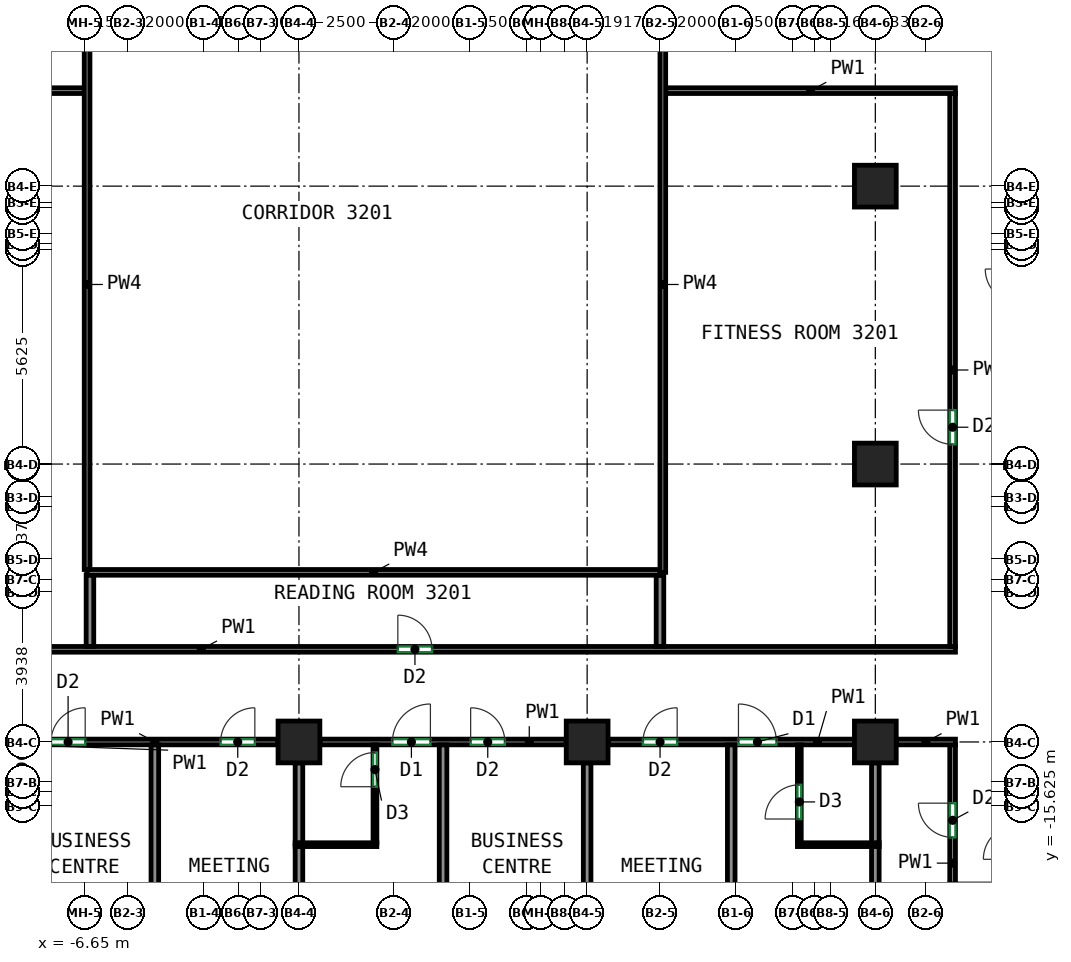
"""IFC4 building model, lengths in metres.
Left out: names, types, materials, properties, quantities, classifications, styles, units other than length and angle.
Written with IfcOpenShell. Run it as: python <this file> out.ifc"""

import sys

from ifc_helpers import new_model, si_unit, direction, frame, frame_2d, origin, origin_2d, place, context, subcontext, project, spatial, rectangle, extrude, source, transform, mapped, element, fill, save


model = new_model("IFC4")
c1 = context("Model", 3, precision=1e-05, world=origin(), true_north=direction((0.0, 1.0)))
c2 = subcontext(c1, "Body", "Model", "MODEL_VIEW")
j1 = project(units=[si_unit("LENGTHUNIT", "METRE"), si_unit("PLANEANGLEUNIT", "RADIAN")], contexts=[c1])
p1 = place(None, origin())
s1 = spatial("IfcSite", under=j1, at=p1, CompositionType="ELEMENT")
p2 = place(p1, origin())
s2 = spatial("IfcBuilding", under=s1, at=p2, CompositionType="ELEMENT")
p3 = place(p2, frame((0.0, 0.0, 143.9)))
s3 = spatial("IfcBuildingStorey", under=s2, at=p3, CompositionType="ELEMENT", Elevation=143.9)
m1 = source(origin(), c2, "Body", "SweptSolid", [
    extrude(rectangle(XDim=1.1, YDim=1.1, at=origin_2d()), origin(), (0.0, 0.0, 1.0), 3.12),
])
for number, where, z_axis, x_axis in (
    (1, (-1.0, -13.938, 0.0), (0.0, 0.0, 1.0), (1.0, 0.0, 0.0)),
    (2, (6.583, -13.938, 0.0), (0.0, 0.0, 1.0), (1.0, 0.0, 0.0)),
    (3, (14.167, -13.938, 0.0), (0.0, 0.0, 1.0), (1.0, 0.0, 0.0)),
    (4, (14.167, -6.625, 0.0), (0.0, 0.0, 1.0), (1.0, 0.0, 0.0)),
    (5, (14.167, 0.688, 0.0), (0.0, 0.0, 1.0), (1.0, 0.0, 0.0)),
):
    element("IfcColumn", number, at=place(p3, frame(where, z_axis=z_axis, x_axis=x_axis)), inside=s3, PredefinedType="COLUMN", context=c2, shape_type="MappedRepresentation", body=[
        mapped(m1, transform((0.0, 0.0, 0.0))),
    ])
p4 = place(p3, frame((-8.033, -13.938, 0.0), z_axis=(0.0, 0.0, 1.0), x_axis=(1.0, 0.0, 0.0)))
e6 = element("IfcWall", 6, at=p4, inside=s3, PredefinedType="PARTITIONING", context=c2, shape_type="SweptSolid", body=[
    extrude(rectangle(XDim=6.483, YDim=0.15, at=frame_2d((3.241, 0.0))), origin(), (0.0, 0.0, 1.0), 3.12),
])
p5 = place(p4, frame((0.508, 0.0, 0.0)))
e7 = element("IfcOpeningElement", 7, at=p5, cuts=e6, PredefinedType="OPENING", context=c2, shape_type="SweptSolid", body=[
    extrude(rectangle(XDim=0.9, YDim=2.1, at=frame_2d((0.45, 1.05))), frame((0.0, 0.085, 0.0), z_axis=(0.0, -1.0, 0.0), x_axis=(1.0, 0.0, 0.0)), (0.0, 0.0, 1.0), 0.17),
])
p6 = place(p4, frame((4.972, 0.0, 0.0)))
e8 = element("IfcOpeningElement", 8, at=p6, cuts=e6, PredefinedType="OPENING", context=c2, shape_type="SweptSolid", body=[
    extrude(rectangle(XDim=0.9, YDim=2.1, at=frame_2d((0.45, 1.05))), frame((0.0, 0.085, 0.0), z_axis=(0.0, -1.0, 0.0), x_axis=(1.0, 0.0, 0.0)), (0.0, 0.0, 1.0), 0.17),
])
p7 = place(p3, frame((-0.45, -13.938, 0.0), z_axis=(0.0, 0.0, 1.0), x_axis=(1.0, 0.0, 0.0)))
e9 = element("IfcWall", 9, at=p7, inside=s3, PredefinedType="PARTITIONING", context=c2, shape_type="SweptSolid", body=[
    extrude(rectangle(XDim=6.483, YDim=0.15, at=frame_2d((3.241, 0.0))), origin(), (0.0, 0.0, 1.0), 3.12),
])
p8 = place(p7, frame((1.909, 0.0, 0.0)))
e10 = element("IfcOpeningElement", 10, at=p8, cuts=e9, PredefinedType="OPENING", context=c2, shape_type="SweptSolid", body=[
    extrude(rectangle(XDim=1.0, YDim=2.1, at=frame_2d((0.5, 1.05))), frame((0.0, 0.085, 0.0), z_axis=(0.0, -1.0, 0.0), x_axis=(1.0, 0.0, 0.0)), (0.0, 0.0, 1.0), 0.17),
])
p9 = place(p7, frame((3.968, 0.0, 0.0)))
e11 = element("IfcOpeningElement", 11, at=p9, cuts=e9, PredefinedType="OPENING", context=c2, shape_type="SweptSolid", body=[
    extrude(rectangle(XDim=0.9, YDim=2.1, at=frame_2d((0.45, 1.05))), frame((0.0, 0.085, 0.0), z_axis=(0.0, -1.0, 0.0), x_axis=(1.0, 0.0, 0.0)), (0.0, 0.0, 1.0), 0.17),
])
p10 = place(p3, frame((7.133, -13.938, 0.0), z_axis=(0.0, 0.0, 1.0), x_axis=(1.0, 0.0, 0.0)))
e12 = element("IfcWall", 12, at=p10, inside=s3, PredefinedType="PARTITIONING", context=c2, shape_type="SweptSolid", body=[
    extrude(rectangle(XDim=6.484, YDim=0.15, at=frame_2d((3.242, 0.0))), origin(), (0.0, 0.0, 1.0), 3.12),
])
p11 = place(p10, frame((0.919, 0.0, 0.0)))
e13 = element("IfcOpeningElement", 13, at=p11, cuts=e12, PredefinedType="OPENING", context=c2, shape_type="SweptSolid", body=[
    extrude(rectangle(XDim=0.9, YDim=2.1, at=frame_2d((0.45, 1.05))), frame((0.0, 0.085, 0.0), z_axis=(0.0, -1.0, 0.0), x_axis=(1.0, 0.0, 0.0)), (0.0, 0.0, 1.0), 0.17),
])
p12 = place(p10, frame((3.432, 0.0, 0.0)))
e14 = element("IfcOpeningElement", 14, at=p12, cuts=e12, PredefinedType="OPENING", context=c2, shape_type="SweptSolid", body=[
    extrude(rectangle(XDim=1.0, YDim=2.1, at=frame_2d((0.5, 1.05))), frame((0.0, 0.085, 0.0), z_axis=(0.0, -1.0, 0.0), x_axis=(1.0, 0.0, 0.0)), (0.0, 0.0, 1.0), 0.17),
])
p13 = place(p3, frame((16.2, -17.675, 0.0), z_axis=(0.0, 0.0, 1.0), x_axis=(0.0, 1.0, 0.0)))
e15 = element("IfcWall", 15, at=p13, inside=s3, PredefinedType="PARTITIONING", context=c2, shape_type="SweptSolid", body=[
    extrude(rectangle(XDim=3.662, YDim=0.15, at=frame_2d((1.831, 0.0))), origin(), (0.0, 0.0, 1.0), 3.12),
])
p14 = place(p13, frame((1.227, 0.0, 0.0)))
e16 = element("IfcOpeningElement", 16, at=p14, cuts=e15, PredefinedType="OPENING", context=c2, shape_type="SweptSolid", body=[
    extrude(rectangle(XDim=0.9, YDim=2.1, at=frame_2d((0.45, 1.05))), frame((0.0, 0.085, 0.0), z_axis=(0.0, -1.0, 0.0), x_axis=(1.0, 0.0, 0.0)), (0.0, 0.0, 1.0), 0.17),
])
p15 = place(p3, frame((14.717, -13.938, 0.0), z_axis=(0.0, 0.0, 1.0), x_axis=(1.0, 0.0, 0.0)))
e17 = element("IfcWall", 17, at=p15, inside=s3, PredefinedType="PARTITIONING", context=c2, shape_type="SweptSolid", body=[
    extrude(rectangle(XDim=1.558, YDim=0.15, at=frame_2d((0.779, 0.0))), origin(), (0.0, 0.0, 1.0), 3.12),
])
p16 = place(p3, frame((-12.075, 3.2, 0.0), z_axis=(0.0, 0.0, 1.0), x_axis=(1.0, 0.0, 0.0)))
e18 = element("IfcWall", 18, at=p16, inside=s3, PredefinedType="PARTITIONING", context=c2, shape_type="SweptSolid", body=[
    extrude(rectangle(XDim=5.425, YDim=0.15, at=frame_2d((2.712, 0.0))), origin(), (0.0, 0.0, 1.0), 3.12),
])
p17 = place(p3, frame((-12.075, -11.5, 0.0), z_axis=(0.0, 0.0, 1.0), x_axis=(1.0, 0.0, 0.0)))
e19 = element("IfcWall", 19, at=p17, inside=s3, PredefinedType="PARTITIONING", context=c2, shape_type="SweptSolid", body=[
    extrude(rectangle(XDim=28.35, YDim=0.15, at=frame_2d((14.175, 0.0))), origin(), (0.0, 0.0, 1.0), 3.12),
])
p18 = place(p17, frame((13.677, 0.0, 0.0)))
e20 = element("IfcOpeningElement", 20, at=p18, cuts=e19, PredefinedType="OPENING", context=c2, shape_type="SweptSolid", body=[
    extrude(rectangle(XDim=0.9, YDim=2.1, at=frame_2d((0.45, 1.05))), frame((0.0, 0.085, 0.0), z_axis=(0.0, -1.0, 0.0), x_axis=(1.0, 0.0, 0.0)), (0.0, 0.0, 1.0), 0.17),
])
p19 = place(p3, frame((16.2, -11.425, 0.0), z_axis=(0.0, 0.0, 1.0), x_axis=(0.0, 1.0, 0.0)))
e21 = element("IfcWall", 21, at=p19, inside=s3, PredefinedType="PARTITIONING", context=c2, shape_type="SweptSolid", body=[
    extrude(rectangle(XDim=14.55, YDim=0.15, at=frame_2d((7.275, 0.0))), origin(), (0.0, 0.0, 1.0), 3.12),
])
p20 = place(p19, frame((5.319, 0.0, 0.0)))
e22 = element("IfcOpeningElement", 22, at=p20, cuts=e21, PredefinedType="OPENING", context=c2, shape_type="SweptSolid", body=[
    extrude(rectangle(XDim=0.9, YDim=2.1, at=frame_2d((0.45, 1.05))), frame((0.0, 0.085, 0.0), z_axis=(0.0, -1.0, 0.0), x_axis=(1.0, 0.0, 0.0)), (0.0, 0.0, 1.0), 0.17),
])
p21 = place(p3, frame((8.65, 3.2, 0.0), z_axis=(0.0, 0.0, 1.0), x_axis=(1.0, 0.0, 0.0)))
e23 = element("IfcWall", 23, at=p21, inside=s3, PredefinedType="PARTITIONING", context=c2, shape_type="SweptSolid", body=[
    extrude(rectangle(XDim=7.625, YDim=0.15, at=frame_2d((3.812, 0.0))), origin(), (0.0, 0.0, 1.0), 3.12),
])
p22 = place(p3, frame((-4.792, -21.0, 0.0), z_axis=(0.0, 0.0, 1.0), x_axis=(0.0, 1.0, 0.0)))
e24 = element("IfcWall", 24, at=p22, inside=s3, PredefinedType="PARTITIONING", context=c2, shape_type="SweptSolid", body=[
    extrude(rectangle(XDim=6.985, YDim=0.2, at=frame_2d((3.493, 0.0))), origin(), (0.0, 0.0, 1.0), 3.12),
])
p23 = place(p3, frame((-1.0, -20.4, 0.0), z_axis=(0.0, 0.0, 1.0), x_axis=(0.0, 1.0, 0.0)))
e25 = element("IfcWall", 25, at=p23, inside=s3, PredefinedType="PARTITIONING", context=c2, shape_type="SweptSolid", body=[
    extrude(rectangle(XDim=3.72, YDim=0.2, at=frame_2d((1.86, 0.0))), origin(), (0.0, 0.0, 1.0), 3.12),
])
p24 = place(p3, frame((-1.0, -16.6, 0.0), z_axis=(0.0, 0.0, 1.0), x_axis=(0.0, 1.0, 0.0)))
e26 = element("IfcWall", 26, at=p24, inside=s3, PredefinedType="PARTITIONING", context=c2, shape_type="SweptSolid", body=[
    extrude(rectangle(XDim=2.112, YDim=0.2, at=frame_2d((1.056, 0.0))), origin(), (0.0, 0.0, 1.0), 3.12),
])
p25 = place(p3, frame((1.0, -16.59, 0.0), z_axis=(0.0, 0.0, 1.0), x_axis=(0.0, 1.0, 0.0)))
e27 = element("IfcWall", 27, at=p25, inside=s3, PredefinedType="PARTITIONING", context=c2, shape_type="SweptSolid", body=[
    extrude(rectangle(XDim=2.575, YDim=0.1, at=frame_2d((1.288, 0.0))), origin(), (0.0, 0.0, 1.0), 3.12),
])
p26 = place(p25, frame((1.475, 0.0, 0.0)))
e28 = element("IfcOpeningElement", 28, at=p26, cuts=e27, PredefinedType="OPENING", context=c2, shape_type="SweptSolid", body=[
    extrude(rectangle(XDim=0.9, YDim=2.1, at=frame_2d((0.45, 1.05))), frame((0.0, 0.06, 0.0), z_axis=(0.0, -1.0, 0.0), x_axis=(1.0, 0.0, 0.0)), (0.0, 0.0, 1.0), 0.12),
])
p27 = place(p3, frame((-1.1, -16.64, 0.0), z_axis=(0.0, 0.0, 1.0), x_axis=(1.0, 0.0, 0.0)))
e29 = element("IfcWall", 29, at=p27, inside=s3, PredefinedType="PARTITIONING", context=c2, shape_type="SweptSolid", body=[
    extrude(rectangle(XDim=2.15, YDim=0.1, at=frame_2d((1.075, 0.0))), origin(), (0.0, 0.0, 1.0), 3.12),
])
p28 = place(p3, frame((2.792, -21.0, 0.0), z_axis=(0.0, 0.0, 1.0), x_axis=(0.0, 1.0, 0.0)))
e30 = element("IfcWall", 30, at=p28, inside=s3, PredefinedType="PARTITIONING", context=c2, shape_type="SweptSolid", body=[
    extrude(rectangle(XDim=6.985, YDim=0.2, at=frame_2d((3.493, 0.0))), origin(), (0.0, 0.0, 1.0), 3.12),
])
p29 = place(p3, frame((6.583, -20.4, 0.0), z_axis=(0.0, 0.0, 1.0), x_axis=(0.0, 1.0, 0.0)))
e31 = element("IfcWall", 31, at=p29, inside=s3, PredefinedType="PARTITIONING", context=c2, shape_type="SweptSolid", body=[
    extrude(rectangle(XDim=5.912, YDim=0.2, at=frame_2d((2.956, 0.0))), origin(), (0.0, 0.0, 1.0), 3.12),
])
p30 = place(p3, frame((10.375, -21.0, 0.0), z_axis=(0.0, 0.0, 1.0), x_axis=(0.0, 1.0, 0.0)))
e32 = element("IfcWall", 32, at=p30, inside=s3, PredefinedType="PARTITIONING", context=c2, shape_type="SweptSolid", body=[
    extrude(rectangle(XDim=6.985, YDim=0.2, at=frame_2d((3.493, 0.0))), origin(), (0.0, 0.0, 1.0), 3.12),
])
p31 = place(p3, frame((12.167, -16.59, 0.0), z_axis=(0.0, 0.0, 1.0), x_axis=(0.0, 1.0, 0.0)))
e33 = element("IfcWall", 33, at=p31, inside=s3, PredefinedType="PARTITIONING", context=c2, shape_type="SweptSolid", body=[
    extrude(rectangle(XDim=2.575, YDim=0.1, at=frame_2d((1.288, 0.0))), origin(), (0.0, 0.0, 1.0), 3.12),
])
p32 = place(p31, frame((0.625, 0.0, 0.0)))
e34 = element("IfcOpeningElement", 34, at=p32, cuts=e33, PredefinedType="OPENING", context=c2, shape_type="SweptSolid", body=[
    extrude(rectangle(XDim=0.9, YDim=2.1, at=frame_2d((0.45, 1.05))), frame((0.0, 0.06, 0.0), z_axis=(0.0, -1.0, 0.0), x_axis=(1.0, 0.0, 0.0)), (0.0, 0.0, 1.0), 0.12),
])
p33 = place(p3, frame((12.117, -16.64, 0.0), z_axis=(0.0, 0.0, 1.0), x_axis=(1.0, 0.0, 0.0)))
e35 = element("IfcWall", 35, at=p33, inside=s3, PredefinedType="PARTITIONING", context=c2, shape_type="SweptSolid", body=[
    extrude(rectangle(XDim=2.15, YDim=0.1, at=frame_2d((1.075, 0.0))), origin(), (0.0, 0.0, 1.0), 3.12),
])
p34 = place(p3, frame((14.167, -20.4, 0.0), z_axis=(0.0, 0.0, 1.0), x_axis=(0.0, 1.0, 0.0)))
e36 = element("IfcWall", 36, at=p34, inside=s3, PredefinedType="PARTITIONING", context=c2, shape_type="SweptSolid", body=[
    extrude(rectangle(XDim=3.71, YDim=0.2, at=frame_2d((1.855, 0.0))), origin(), (0.0, 0.0, 1.0), 3.12),
])
p35 = place(p3, frame((14.167, -16.59, 0.0), z_axis=(0.0, 0.0, 1.0), x_axis=(0.0, 1.0, 0.0)))
e37 = element("IfcWall", 37, at=p35, inside=s3, PredefinedType="PARTITIONING", context=c2, shape_type="SweptSolid", body=[
    extrude(rectangle(XDim=2.102, YDim=0.2, at=frame_2d((1.051, 0.0))), origin(), (0.0, 0.0, 1.0), 3.12),
])
p36 = place(p3, frame((-6.5, -11.423, 0.0), z_axis=(0.0, 0.0, 1.0), x_axis=(0.0, 1.0, 0.0)))
e38 = element("IfcWall", 38, at=p36, inside=s3, PredefinedType="PARTITIONING", context=c2, shape_type="SweptSolid", body=[
    extrude(rectangle(XDim=1.883, YDim=0.2, at=frame_2d((0.941, 0.0))), origin(), (0.0, 0.0, 1.0), 3.12),
])
p37 = place(p3, frame((8.5, -11.423, 0.0), z_axis=(0.0, 0.0, 1.0), x_axis=(0.0, 1.0, 0.0)))
e39 = element("IfcWall", 39, at=p37, inside=s3, PredefinedType="PARTITIONING", context=c2, shape_type="SweptSolid", body=[
    extrude(rectangle(XDim=1.873, YDim=0.2, at=frame_2d((0.937, 0.0))), origin(), (0.0, 0.0, 1.0), 3.12),
])
p38 = place(p3, frame((8.5, -9.475, 0.0), z_axis=(0.0, 0.0, 1.0), x_axis=(-1.0, 0.0, 0.0)))
e40 = element("IfcWall", 40, at=p38, inside=s3, PredefinedType="PARTITIONING", context=c2, shape_type="SweptSolid", body=[
    extrude(rectangle(XDim=15.075, YDim=0.15, at=frame_2d((7.538, 0.0))), origin(), (0.0, 0.0, 1.0), 3.12),
])
p39 = place(p3, frame((-6.575, -9.4, 0.0), z_axis=(0.0, 0.0, 1.0), x_axis=(0.0, 1.0, 0.0)))
e41 = element("IfcWall", 41, at=p39, inside=s3, PredefinedType="PARTITIONING", context=c2, shape_type="SweptSolid", body=[
    extrude(rectangle(XDim=15.0, YDim=0.15, at=frame_2d((7.5, 0.0))), origin(), (0.0, 0.0, 1.0), 3.12),
])
p40 = place(p3, frame((8.575, 5.675, 0.0), z_axis=(0.0, 0.0, 1.0), x_axis=(0.0, -1.0, 0.0)))
e42 = element("IfcWall", 42, at=p40, inside=s3, PredefinedType="PARTITIONING", context=c2, shape_type="SweptSolid", body=[
    extrude(rectangle(XDim=15.15, YDim=0.15, at=frame_2d((7.575, 0.0))), origin(), (0.0, 0.0, 1.0), 3.12),
])
p41 = place(p14, origin())
e43 = element("IfcDoor", 43, at=p41, inside=s3, OperationType="SINGLE_SWING_RIGHT", PredefinedType="DOOR", context=c2, shape_type="SweptSolid", body=[
    extrude(rectangle(XDim=0.9, YDim=2.1, at=frame_2d((0.45, 1.05))), frame((0.0, 0.025, 0.0), z_axis=(0.0, -1.0, 0.0), x_axis=(1.0, 0.0, 0.0)), (0.0, 0.0, 1.0), 0.05),
])
fill(e16, e43)
p42 = place(p32, origin())
e44 = element("IfcDoor", 44, at=p42, inside=s3, OperationType="SINGLE_SWING_LEFT", PredefinedType="DOOR", context=c2, shape_type="SweptSolid", body=[
    extrude(rectangle(XDim=0.9, YDim=2.1, at=frame_2d((0.45, 1.05))), frame((0.0, 0.025, 0.0), z_axis=(0.0, -1.0, 0.0), x_axis=(1.0, 0.0, 0.0)), (0.0, 0.0, 1.0), 0.05),
])
fill(e34, e44)
p43 = place(p26, origin())
e45 = element("IfcDoor", 45, at=p43, inside=s3, OperationType="SINGLE_SWING_LEFT", PredefinedType="DOOR", context=c2, shape_type="SweptSolid", body=[
    extrude(rectangle(XDim=0.9, YDim=2.1, at=frame_2d((0.45, 1.05))), frame((0.0, 0.025, 0.0), z_axis=(0.0, -1.0, 0.0), x_axis=(1.0, 0.0, 0.0)), (0.0, 0.0, 1.0), 0.05),
])
fill(e28, e45)
p44 = place(p5, origin())
e46 = element("IfcDoor", 46, at=p44, inside=s3, OperationType="SINGLE_SWING_RIGHT", PredefinedType="DOOR", context=c2, shape_type="SweptSolid", body=[
    extrude(rectangle(XDim=0.9, YDim=2.1, at=frame_2d((0.45, 1.05))), frame((0.0, 0.025, 0.0), z_axis=(0.0, -1.0, 0.0), x_axis=(1.0, 0.0, 0.0)), (0.0, 0.0, 1.0), 0.05),
])
fill(e7, e46)
p45 = place(p6, origin())
e47 = element("IfcDoor", 47, at=p45, inside=s3, OperationType="SINGLE_SWING_RIGHT", PredefinedType="DOOR", context=c2, shape_type="SweptSolid", body=[
    extrude(rectangle(XDim=0.9, YDim=2.1, at=frame_2d((0.45, 1.05))), frame((0.0, 0.025, 0.0), z_axis=(0.0, -1.0, 0.0), x_axis=(1.0, 0.0, 0.0)), (0.0, 0.0, 1.0), 0.05),
])
fill(e8, e47)
p46 = place(p8, origin())
e48 = element("IfcDoor", 48, at=p46, inside=s3, OperationType="SINGLE_SWING_RIGHT", PredefinedType="DOOR", context=c2, shape_type="SweptSolid", body=[
    extrude(rectangle(XDim=1.0, YDim=2.1, at=frame_2d((0.5, 1.05))), frame((0.0, 0.025, 0.0), z_axis=(0.0, -1.0, 0.0), x_axis=(1.0, 0.0, 0.0)), (0.0, 0.0, 1.0), 0.05),
])
fill(e10, e48)
p47 = place(p9, origin())
e49 = element("IfcDoor", 49, at=p47, inside=s3, OperationType="SINGLE_SWING_LEFT", PredefinedType="DOOR", context=c2, shape_type="SweptSolid", body=[
    extrude(rectangle(XDim=0.9, YDim=2.1, at=frame_2d((0.45, 1.05))), frame((0.0, 0.025, 0.0), z_axis=(0.0, -1.0, 0.0), x_axis=(1.0, 0.0, 0.0)), (0.0, 0.0, 1.0), 0.05),
])
fill(e11, e49)
p48 = place(p11, origin())
e50 = element("IfcDoor", 50, at=p48, inside=s3, OperationType="SINGLE_SWING_RIGHT", PredefinedType="DOOR", context=c2, shape_type="SweptSolid", body=[
    extrude(rectangle(XDim=0.9, YDim=2.1, at=frame_2d((0.45, 1.05))), frame((0.0, 0.025, 0.0), z_axis=(0.0, -1.0, 0.0), x_axis=(1.0, 0.0, 0.0)), (0.0, 0.0, 1.0), 0.05),
])
fill(e13, e50)
p49 = place(p12, origin())
e51 = element("IfcDoor", 51, at=p49, inside=s3, OperationType="SINGLE_SWING_LEFT", PredefinedType="DOOR", context=c2, shape_type="SweptSolid", body=[
    extrude(rectangle(XDim=1.0, YDim=2.1, at=frame_2d((0.5, 1.05))), frame((0.0, 0.025, 0.0), z_axis=(0.0, -1.0, 0.0), x_axis=(1.0, 0.0, 0.0)), (0.0, 0.0, 1.0), 0.05),
])
fill(e14, e51)
p50 = place(p18, origin())
e52 = element("IfcDoor", 52, at=p50, inside=s3, OperationType="SINGLE_SWING_LEFT", PredefinedType="DOOR", context=c2, shape_type="SweptSolid", body=[
    extrude(rectangle(XDim=0.9, YDim=2.1, at=frame_2d((0.45, 1.05))), frame((0.0, 0.025, 0.0), z_axis=(0.0, -1.0, 0.0), x_axis=(1.0, 0.0, 0.0)), (0.0, 0.0, 1.0), 0.05),
])
fill(e20, e52)
p51 = place(p20, origin())
e53 = element("IfcDoor", 53, at=p51, inside=s3, OperationType="SINGLE_SWING_RIGHT", PredefinedType="DOOR", context=c2, shape_type="SweptSolid", body=[
    extrude(rectangle(XDim=0.9, YDim=2.1, at=frame_2d((0.45, 1.05))), frame((0.0, 0.025, 0.0), z_axis=(0.0, -1.0, 0.0), x_axis=(1.0, 0.0, 0.0)), (0.0, 0.0, 1.0), 0.05),
])
fill(e22, e53)
save(model, sys.argv[1])
